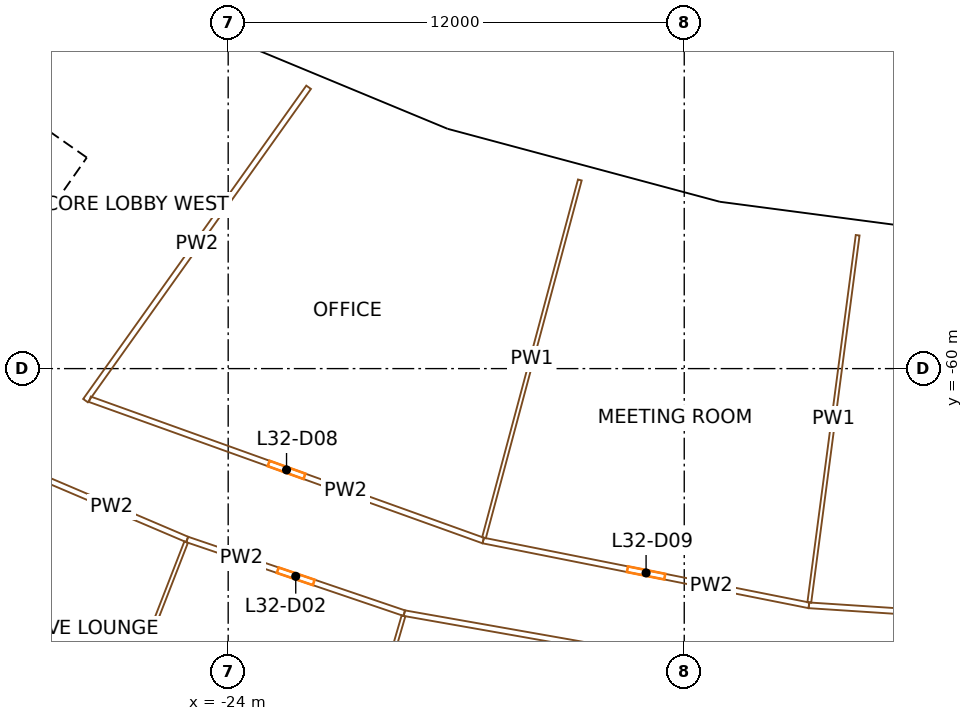
"""IFC4 building model, lengths in metres.
Left out: names, types, materials, properties, quantities, classifications, styles, units other than length and angle.
Written with IfcOpenShell. Run it as: python <this file> out.ifc"""

import sys

from ifc_helpers import new_model, si_unit, direction, frame, frame_2d, origin, origin_2d, place, context, subcontext, project, spatial, rectangle, extrude, element, fill, save


model = new_model("IFC4")
c1 = context("Model", 3, precision=1e-05, world=origin(), true_north=direction((0.0, 1.0)))
c2 = subcontext(c1, "Body", "Model", "MODEL_VIEW")
j1 = project(units=[si_unit("LENGTHUNIT", "METRE"), si_unit("PLANEANGLEUNIT", "RADIAN")], contexts=[c1])
p1 = place(None, origin())
s1 = spatial("IfcSite", under=j1, at=p1, CompositionType="ELEMENT")
p2 = place(p1, origin())
s2 = spatial("IfcBuilding", under=s1, at=p2, CompositionType="ELEMENT")
p3 = place(p2, frame((0.0, 0.0, 140.5)))
s3 = spatial("IfcBuildingStorey", under=s2, at=p3, CompositionType="ELEMENT", Elevation=140.5)
for number, where, z_axis, x_axis in (
    (1, (-25.763, -52.243, 0.0), (0.0, 0.0, 1.0), (0.897, -0.442, 0.0)),
    (2, (-18.724, -55.159, 0.0), (0.0, 0.0, 1.0), (0.947, -0.321, 0.0)),
    (3, (-11.364, -57.131, 0.0), (0.0, 0.0, 1.0), (0.981, -0.195, 0.0)),
):
    element("IfcColumn", number, at=place(p3, frame(where, z_axis=z_axis, x_axis=x_axis)), inside=s3, PredefinedType="COLUMN", context=c2, shape_type="SweptSolid", body=[
        extrude(rectangle(XDim=1.2, YDim=1.5, at=origin_2d()), origin(), (0.0, 0.0, 1.0), 3.8),
    ])
p4 = place(p3, frame((-36.717, -66.337, 0.0), z_axis=(0.0, 0.0, 1.0), x_axis=(0.573577477574, 0.819151315216, 0.0)))
e4 = element("IfcWall", 4, at=p4, inside=s3, PredefinedType="SHEAR", context=c2, shape_type="SweptSolid", body=[
    extrude(rectangle(XDim=14.8, YDim=0.9, at=frame_2d((7.4, 0.0))), origin(), (0.0, 0.0, 1.0), 3.4),
])
p5 = place(p4, frame((6.2, 0.0, 0.0)))
e5 = element("IfcOpeningElement", 5, at=p5, cuts=e4, PredefinedType="OPENING", context=c2, shape_type="SweptSolid", body=[
    extrude(rectangle(XDim=2.4, YDim=2.1, at=frame_2d((1.2, 1.05))), frame((0.0, 0.46, 0.0), z_axis=(0.0, -1.0, 0.0), x_axis=(1.0, 0.0, 0.0)), (0.0, 0.0, 1.0), 0.92),
])
p6 = place(p3, frame((-28.854, -54.324, 0.0), z_axis=(0.0, 0.0, 1.0), x_axis=(-0.819145767589, 0.573585400304, 0.0)))
e6 = element("IfcWall", 6, at=p6, inside=s3, PredefinedType="SHEAR", context=c2, shape_type="SweptSolid", body=[
    extrude(rectangle(XDim=15.045, YDim=0.9, at=frame_2d((7.523, 0.0))), origin(), (0.0, 0.0, 1.0), 3.4),
])
p7 = place(p6, frame((0.9, 0.0, 0.0)))
e7 = element("IfcOpeningElement", 7, at=p7, cuts=e6, PredefinedType="OPENING", context=c2, shape_type="SweptSolid", body=[
    extrude(rectangle(XDim=1.0, YDim=2.1, at=frame_2d((0.5, 1.05))), frame((0.0, 0.46, 0.0), z_axis=(0.0, -1.0, 0.0), x_axis=(1.0, 0.0, 0.0)), (0.0, 0.0, 1.0), 0.92),
])
p8 = place(p6, frame((4.975, 0.0, 0.0)))
e8 = element("IfcOpeningElement", 8, at=p8, cuts=e6, PredefinedType="OPENING", context=c2, shape_type="SweptSolid", body=[
    extrude(rectangle(XDim=0.9, YDim=2.1, at=frame_2d((0.45, 1.05))), frame((0.0, 0.46, 0.0), z_axis=(0.0, -1.0, 0.0), x_axis=(1.0, 0.0, 0.0)), (0.0, 0.0, 1.0), 0.92),
])
p9 = place(p6, frame((13.495, 0.0, 0.0)))
e9 = element("IfcOpeningElement", 9, at=p9, cuts=e6, PredefinedType="OPENING", context=c2, shape_type="SweptSolid", body=[
    extrude(rectangle(XDim=1.1, YDim=2.1, at=frame_2d((0.55, 1.05))), frame((0.0, 0.46, 0.0), z_axis=(0.0, -1.0, 0.0), x_axis=(1.0, 0.0, 0.0)), (0.0, 0.0, 1.0), 0.92),
])
p10 = place(p3, frame((-18.267, -53.89, 0.0), z_axis=(0.0, 0.0, 1.0), x_axis=(-0.923879826967, 0.382682721486, 0.0)))
e10 = element("IfcWall", 10, at=p10, inside=s3, PredefinedType="SOLIDWALL", context=c2, shape_type="SweptSolid", body=[
    extrude(rectangle(XDim=7.493, YDim=0.4, at=frame_2d((3.747, 0.0))), origin(), (0.0, 0.0, 1.0), 2.7),
])
p11 = place(p10, frame((4.301, 0.0, 0.9)))
e11 = element("IfcOpeningElement", 11, at=p11, cuts=e10, PredefinedType="OPENING", context=c2, shape_type="SweptSolid", body=[
    extrude(rectangle(XDim=2.6, YDim=1.65, at=frame_2d((1.3, 0.825))), frame((0.0, 0.21, 0.0), z_axis=(0.0, -1.0, 0.0), x_axis=(1.0, 0.0, 0.0)), (0.0, 0.0, 1.0), 0.42),
])
p12 = place(p10, frame((0.592, 0.0, 0.9)))
e12 = element("IfcOpeningElement", 12, at=p12, cuts=e10, PredefinedType="OPENING", context=c2, shape_type="SweptSolid", body=[
    extrude(rectangle(XDim=2.6, YDim=1.65, at=frame_2d((1.3, 0.825))), frame((0.0, 0.21, 0.0), z_axis=(0.0, -1.0, 0.0), x_axis=(1.0, 0.0, 0.0)), (0.0, 0.0, 1.0), 0.42),
])
p13 = place(p3, frame((-11.15, -55.794, 0.0), z_axis=(0.0, 0.0, 1.0), x_axis=(-0.965924597867, 0.258823629594, 0.0)))
e13 = element("IfcWall", 13, at=p13, inside=s3, PredefinedType="SOLIDWALL", context=c2, shape_type="SweptSolid", body=[
    extrude(rectangle(XDim=7.342, YDim=0.4, at=frame_2d((3.671, 0.0))), origin(), (0.0, 0.0, 1.0), 2.7),
])
p14 = place(p13, frame((4.225, 0.0, 0.9)))
e14 = element("IfcOpeningElement", 14, at=p14, cuts=e13, PredefinedType="OPENING", context=c2, shape_type="SweptSolid", body=[
    extrude(rectangle(XDim=2.6, YDim=1.65, at=frame_2d((1.3, 0.825))), frame((0.0, 0.21, 0.0), z_axis=(0.0, -1.0, 0.0), x_axis=(1.0, 0.0, 0.0)), (0.0, 0.0, 1.0), 0.42),
])
p15 = place(p13, frame((0.517, 0.0, 0.9)))
e15 = element("IfcOpeningElement", 15, at=p15, cuts=e13, PredefinedType="OPENING", context=c2, shape_type="SweptSolid", body=[
    extrude(rectangle(XDim=2.6, YDim=1.65, at=frame_2d((1.3, 0.825))), frame((0.0, 0.21, 0.0), z_axis=(0.0, -1.0, 0.0), x_axis=(1.0, 0.0, 0.0)), (0.0, 0.0, 1.0), 0.42),
])
p16 = place(p3, frame((-3.697, -56.782, 0.0), z_axis=(0.0, 0.0, 1.0), x_axis=(-0.991444533306, 0.130528684121, 0.0)))
e16 = element("IfcWall", 16, at=p16, inside=s3, PredefinedType="SOLIDWALL", context=c2, shape_type="SweptSolid", body=[
    extrude(rectangle(XDim=7.493, YDim=0.4, at=frame_2d((3.747, 0.0))), origin(), (0.0, 0.0, 1.0), 2.7),
])
p17 = place(p16, frame((4.301, 0.0, 0.9)))
e17 = element("IfcOpeningElement", 17, at=p17, cuts=e16, PredefinedType="OPENING", context=c2, shape_type="SweptSolid", body=[
    extrude(rectangle(XDim=2.6, YDim=1.65, at=frame_2d((1.3, 0.825))), frame((0.0, 0.21, 0.0), z_axis=(0.0, -1.0, 0.0), x_axis=(1.0, 0.0, 0.0)), (0.0, 0.0, 1.0), 0.42),
])
p18 = place(p16, frame((0.592, 0.0, 0.9)))
e18 = element("IfcOpeningElement", 18, at=p18, cuts=e16, PredefinedType="OPENING", context=c2, shape_type="SweptSolid", body=[
    extrude(rectangle(XDim=2.6, YDim=1.65, at=frame_2d((1.3, 0.825))), frame((0.0, 0.21, 0.0), z_axis=(0.0, -1.0, 0.0), x_axis=(1.0, 0.0, 0.0)), (0.0, 0.0, 1.0), 0.42),
])
p19 = place(p3, frame((-29.059, -62.801, 0.0), z_axis=(0.0, 0.0, 1.0), x_axis=(0.9200243558, -0.391861180438, 0.0)))
e19 = element("IfcWall", 19, at=p19, inside=s3, PredefinedType="PARTITIONING", context=c2, shape_type="SweptSolid", body=[
    extrude(rectangle(XDim=4.326, YDim=0.15, at=frame_2d((2.163, 0.0))), origin(), (0.0, 0.0, 1.0), 2.4),
])
p20 = place(p3, frame((-28.612, -73.582, 0.0), z_axis=(0.0, 0.0, 1.0), x_axis=(0.362392675792, 0.93202550852, 0.0)))
e20 = element("IfcWall", 20, at=p20, inside=s3, PredefinedType="PARTITIONING", context=c2, shape_type="SweptSolid", body=[
    extrude(rectangle(XDim=9.674, YDim=0.1, at=frame_2d((4.837, 0.0))), origin(), (0.0, 0.0, 1.0), 2.4),
])
p21 = place(p3, frame((-27.64, -60.807, 0.0), z_axis=(0.0, 0.0, 1.0), x_axis=(0.941150861554, -0.337986768669, 0.0)))
e21 = element("IfcWall", 21, at=p21, inside=s3, PredefinedType="PARTITIONING", context=c2, shape_type="SweptSolid", body=[
    extrude(rectangle(XDim=10.998, YDim=0.15, at=frame_2d((5.499, 0.0))), origin(), (0.0, 0.0, 1.0), 2.4),
])
p22 = place(p21, frame((4.999, 0.0, 0.0)))
e22 = element("IfcOpeningElement", 22, at=p22, cuts=e21, PredefinedType="OPENING", context=c2, shape_type="SweptSolid", body=[
    extrude(rectangle(XDim=1.0, YDim=2.1, at=frame_2d((0.5, 1.05))), frame((0.0, 0.085, 0.0), z_axis=(0.0, -1.0, 0.0), x_axis=(1.0, 0.0, 0.0)), (0.0, 0.0, 1.0), 0.17),
])
p23 = place(p3, frame((-19.366, -66.435, 0.0), z_axis=(0.0, 0.0, 1.0), x_axis=(-0.94693295825, 0.321431131939, 0.0)))
e23 = element("IfcWall", 23, at=p23, inside=s3, PredefinedType="PARTITIONING", context=c2, shape_type="SweptSolid", body=[
    extrude(rectangle(XDim=6.033, YDim=0.15, at=frame_2d((3.017, 0.0))), origin(), (0.0, 0.0, 1.0), 2.4),
])
p24 = place(p23, frame((2.517, 0.0, 0.0)))
e24 = element("IfcOpeningElement", 24, at=p24, cuts=e23, PredefinedType="OPENING", context=c2, shape_type="SweptSolid", body=[
    extrude(rectangle(XDim=1.0, YDim=2.1, at=frame_2d((0.5, 1.05))), frame((0.0, 0.085, 0.0), z_axis=(0.0, -1.0, 0.0), x_axis=(1.0, 0.0, 0.0)), (0.0, 0.0, 1.0), 0.17),
])
p25 = place(p3, frame((-22.094, -75.794, 0.0), z_axis=(0.0, 0.0, 1.0), x_axis=(0.279846881911, 0.960044646194, 0.0)))
e25 = element("IfcWall", 25, at=p25, inside=s3, PredefinedType="PARTITIONING", context=c2, shape_type="SweptSolid", body=[
    extrude(rectangle(XDim=9.674, YDim=0.1, at=frame_2d((4.837, 0.0))), origin(), (0.0, 0.0, 1.0), 2.4),
])
p26 = place(p3, frame((-21.884, -52.598, 0.0), z_axis=(0.0, 0.0, 1.0), x_axis=(-0.580016763963, -0.814604538118, 0.0)))
e26 = element("IfcWall", 26, at=p26, inside=s3, PredefinedType="PARTITIONING", context=c2, shape_type="SweptSolid", body=[
    extrude(rectangle(XDim=10.121, YDim=0.15, at=frame_2d((5.061, 0.0))), origin(), (0.0, 0.0, 1.0), 2.4),
])
p27 = place(p3, frame((-4.526, -69.052, 0.0), z_axis=(0.0, 0.0, 1.0), x_axis=(-0.984805080703, 0.173663332402, 0.0)))
e27 = element("IfcWall", 27, at=p27, inside=s3, PredefinedType="PARTITIONING", context=c2, shape_type="SweptSolid", body=[
    extrude(rectangle(XDim=15.069, YDim=0.15, at=frame_2d((7.535, 0.0))), origin(), (0.0, 0.0, 1.0), 2.4),
])
p28 = place(p27, frame((6.635, 0.0, 0.0)))
e28 = element("IfcOpeningElement", 28, at=p28, cuts=e27, PredefinedType="OPENING", context=c2, shape_type="SweptSolid", body=[
    extrude(rectangle(XDim=1.8, YDim=2.1, at=frame_2d((0.9, 1.05))), frame((0.0, 0.085, 0.0), z_axis=(0.0, -1.0, 0.0), x_axis=(1.0, 0.0, 0.0)), (0.0, 0.0, 1.0), 0.17),
])
p29 = place(p3, frame((-17.289, -64.524, 0.0), z_axis=(0.0, 0.0, 1.0), x_axis=(0.980786466832, -0.195084357342, 0.0)))
e29 = element("IfcWall", 29, at=p29, inside=s3, PredefinedType="PARTITIONING", context=c2, shape_type="SweptSolid", body=[
    extrude(rectangle(XDim=8.738, YDim=0.15, at=frame_2d((4.369, 0.0))), origin(), (0.0, 0.0, 1.0), 2.4),
])
p30 = place(p29, frame((3.869, 0.0, 0.0)))
e30 = element("IfcOpeningElement", 30, at=p30, cuts=e29, PredefinedType="OPENING", context=c2, shape_type="SweptSolid", body=[
    extrude(rectangle(XDim=1.0, YDim=2.1, at=frame_2d((0.5, 1.05))), frame((0.0, 0.085, 0.0), z_axis=(0.0, -1.0, 0.0), x_axis=(1.0, 0.0, 0.0)), (0.0, 0.0, 1.0), 0.17),
])
p31 = place(p3, frame((-14.747, -55.037, 0.0), z_axis=(0.0, 0.0, 1.0), x_axis=(-0.258833329344, -0.965921998725, 0.0)))
e31 = element("IfcWall", 31, at=p31, inside=s3, PredefinedType="PARTITIONING", context=c2, shape_type="SweptSolid", body=[
    extrude(rectangle(XDim=9.746, YDim=0.1, at=frame_2d((4.873, 0.0))), origin(), (0.0, 0.0, 1.0), 2.4),
])
p32 = place(p3, frame((-8.719, -66.229, 0.0), z_axis=(0.0, 0.0, 1.0), x_axis=(0.997858593599, -0.065408158359, 0.0)))
e32 = element("IfcWall", 32, at=p32, inside=s3, PredefinedType="PARTITIONING", context=c2, shape_type="SweptSolid", body=[
    extrude(rectangle(XDim=8.738, YDim=0.15, at=frame_2d((4.369, 0.0))), origin(), (0.0, 0.0, 1.0), 2.4),
])
p33 = place(p32, frame((3.869, 0.0, 0.0)))
e33 = element("IfcOpeningElement", 33, at=p33, cuts=e32, PredefinedType="OPENING", context=c2, shape_type="SweptSolid", body=[
    extrude(rectangle(XDim=1.0, YDim=2.1, at=frame_2d((0.5, 1.05))), frame((0.0, 0.085, 0.0), z_axis=(0.0, -1.0, 0.0), x_axis=(1.0, 0.0, 0.0)), (0.0, 0.0, 1.0), 0.17),
])
p34 = place(p3, frame((-7.437, -56.491, 0.0), z_axis=(0.0, 0.0, 1.0), x_axis=(-0.13053421433, -0.99144380521, 0.0)))
e34 = element("IfcWall", 34, at=p34, inside=s3, PredefinedType="PARTITIONING", context=c2, shape_type="SweptSolid", body=[
    extrude(rectangle(XDim=9.746, YDim=0.1, at=frame_2d((4.873, 0.0))), origin(), (0.0, 0.0, 1.0), 2.4),
])
p35 = place(p11, origin())
e35 = element("IfcWindow", 35, at=p35, inside=s3, PartitioningType="SINGLE_PANEL", PredefinedType="WINDOW", context=c2, shape_type="SweptSolid", body=[
    extrude(rectangle(XDim=2.6, YDim=1.65, at=frame_2d((1.3, 0.825))), frame((0.0, 0.03, 0.0), z_axis=(0.0, -1.0, 0.0), x_axis=(1.0, 0.0, 0.0)), (0.0, 0.0, 1.0), 0.06),
])
fill(e11, e35)
p36 = place(p12, origin())
e36 = element("IfcWindow", 36, at=p36, inside=s3, PartitioningType="SINGLE_PANEL", PredefinedType="WINDOW", context=c2, shape_type="SweptSolid", body=[
    extrude(rectangle(XDim=2.6, YDim=1.65, at=frame_2d((1.3, 0.825))), frame((0.0, 0.03, 0.0), z_axis=(0.0, -1.0, 0.0), x_axis=(1.0, 0.0, 0.0)), (0.0, 0.0, 1.0), 0.06),
])
fill(e12, e36)
p37 = place(p14, origin())
e37 = element("IfcWindow", 37, at=p37, inside=s3, PartitioningType="SINGLE_PANEL", PredefinedType="WINDOW", context=c2, shape_type="SweptSolid", body=[
    extrude(rectangle(XDim=2.6, YDim=1.65, at=frame_2d((1.3, 0.825))), frame((0.0, 0.03, 0.0), z_axis=(0.0, -1.0, 0.0), x_axis=(1.0, 0.0, 0.0)), (0.0, 0.0, 1.0), 0.06),
])
fill(e14, e37)
p38 = place(p15, origin())
e38 = element("IfcWindow", 38, at=p38, inside=s3, PartitioningType="SINGLE_PANEL", PredefinedType="WINDOW", context=c2, shape_type="SweptSolid", body=[
    extrude(rectangle(XDim=2.6, YDim=1.65, at=frame_2d((1.3, 0.825))), frame((0.0, 0.03, 0.0), z_axis=(0.0, -1.0, 0.0), x_axis=(1.0, 0.0, 0.0)), (0.0, 0.0, 1.0), 0.06),
])
fill(e15, e38)
p39 = place(p17, origin())
e39 = element("IfcWindow", 39, at=p39, inside=s3, PartitioningType="SINGLE_PANEL", PredefinedType="WINDOW", context=c2, shape_type="SweptSolid", body=[
    extrude(rectangle(XDim=2.6, YDim=1.65, at=frame_2d((1.3, 0.825))), frame((0.0, 0.03, 0.0), z_axis=(0.0, -1.0, 0.0), x_axis=(1.0, 0.0, 0.0)), (0.0, 0.0, 1.0), 0.06),
])
fill(e17, e39)
p40 = place(p18, origin())
e40 = element("IfcWindow", 40, at=p40, inside=s3, PartitioningType="SINGLE_PANEL", PredefinedType="WINDOW", context=c2, shape_type="SweptSolid", body=[
    extrude(rectangle(XDim=2.6, YDim=1.65, at=frame_2d((1.3, 0.825))), frame((0.0, 0.03, 0.0), z_axis=(0.0, -1.0, 0.0), x_axis=(1.0, 0.0, 0.0)), (0.0, 0.0, 1.0), 0.06),
])
fill(e18, e40)
p41 = place(p24, origin())
e41 = element("IfcDoor", 41, at=p41, inside=s3, OperationType="SINGLE_SWING_RIGHT", PredefinedType="DOOR", context=c2, shape_type="SweptSolid", body=[
    extrude(rectangle(XDim=1.0, YDim=2.1, at=frame_2d((0.5, 1.05))), frame((0.0, 0.025, 0.0), z_axis=(0.0, -1.0, 0.0), x_axis=(1.0, 0.0, 0.0)), (0.0, 0.0, 1.0), 0.05),
])
fill(e24, e41)
p42 = place(p22, origin())
e42 = element("IfcDoor", 42, at=p42, inside=s3, OperationType="SINGLE_SWING_RIGHT", PredefinedType="DOOR", context=c2, shape_type="SweptSolid", body=[
    extrude(rectangle(XDim=1.0, YDim=2.1, at=frame_2d((0.5, 1.05))), frame((0.0, 0.025, 0.0), z_axis=(0.0, -1.0, 0.0), x_axis=(1.0, 0.0, 0.0)), (0.0, 0.0, 1.0), 0.05),
])
fill(e22, e42)
p43 = place(p30, origin())
e43 = element("IfcDoor", 43, at=p43, inside=s3, OperationType="SINGLE_SWING_RIGHT", PredefinedType="DOOR", context=c2, shape_type="SweptSolid", body=[
    extrude(rectangle(XDim=1.0, YDim=2.1, at=frame_2d((0.5, 1.05))), frame((0.0, 0.025, 0.0), z_axis=(0.0, -1.0, 0.0), x_axis=(1.0, 0.0, 0.0)), (0.0, 0.0, 1.0), 0.05),
])
fill(e30, e43)
save(model, sys.argv[1])
